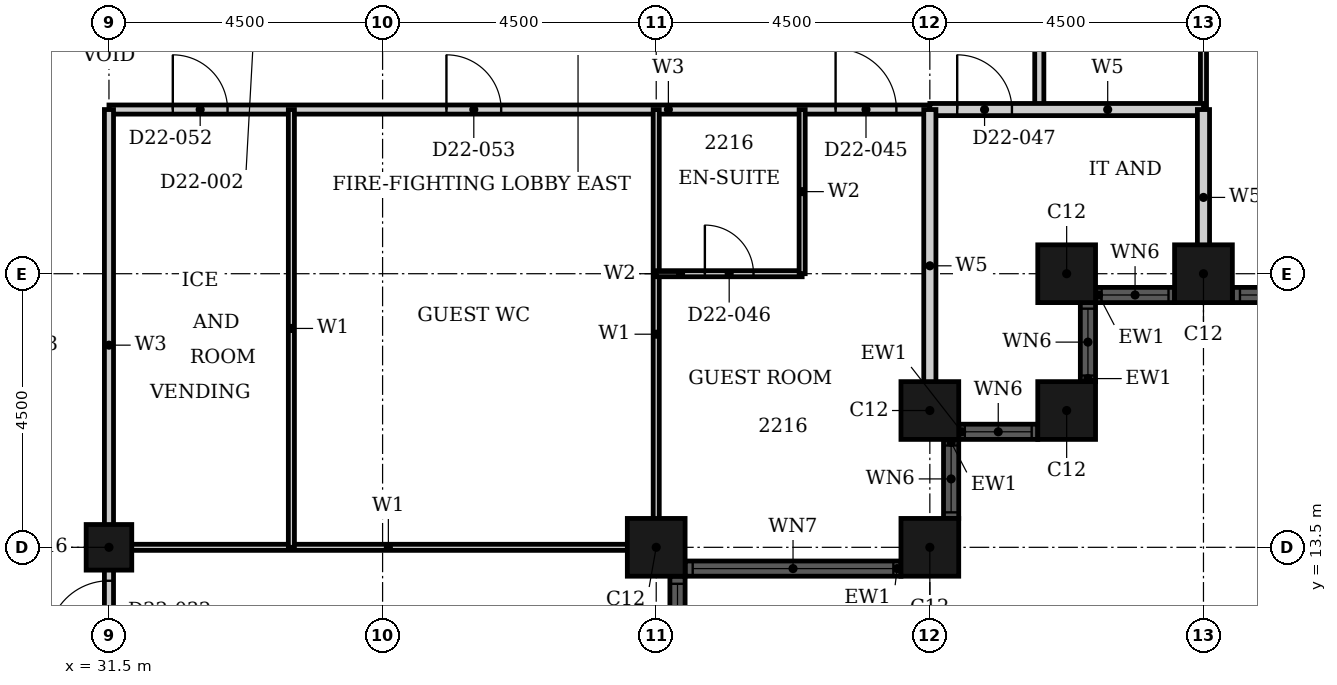
"""IFC4 building model, lengths in metres.
Left out: names, types, materials, properties, quantities, classifications, styles, units other than length and angle.
Written with IfcOpenShell. Run it as: python <this file> out.ifc"""

import sys

from ifc_helpers import new_model, si_unit, direction, frame, frame_2d, origin, origin_2d, place, context, subcontext, project, spatial, rectangle, hollow_rectangle, extrude, element, fill, save


model = new_model("IFC4")
c1 = context("Model", 3, precision=1e-05, world=origin(), true_north=direction((0.0, 1.0)))
c2 = subcontext(c1, "Body", "Model", "MODEL_VIEW")
j1 = project(units=[si_unit("LENGTHUNIT", "METRE"), si_unit("PLANEANGLEUNIT", "RADIAN")], contexts=[c1])
p1 = place(None, origin())
s1 = spatial("IfcSite", under=j1, at=p1, CompositionType="ELEMENT")
p2 = place(p1, origin())
s2 = spatial("IfcBuilding", under=s1, at=p2, CompositionType="ELEMENT")
p3 = place(p2, frame((0.0, 0.0, 92.4)))
s3 = spatial("IfcBuildingStorey", under=s2, at=p3, CompositionType="ELEMENT", Elevation=92.4)
for number, where, z_axis, x_axis in (
    (1, (40.5, 13.5, 0.0), (0.0, 0.0, 1.0), (1.0, 0.0, 0.0)),
    (2, (45.0, 13.5, 0.0), (0.0, 0.0, 1.0), (1.0, 0.0, 0.0)),
    (3, (45.0, 15.75, 0.0), (0.0, 0.0, 1.0), (1.0, 0.0, 0.0)),
    (4, (47.25, 15.75, 0.0), (0.0, 0.0, 1.0), (1.0, 0.0, 0.0)),
    (5, (47.25, 18.0, 0.0), (0.0, 0.0, 1.0), (1.0, 0.0, 0.0)),
    (6, (49.5, 18.0, 0.0), (0.0, 0.0, 1.0), (1.0, 0.0, 0.0)),
):
    element("IfcColumn", number, at=place(p3, frame(where, z_axis=z_axis, x_axis=x_axis)), inside=s3, PredefinedType="COLUMN", context=c2, shape_type="SweptSolid", body=[
        extrude(hollow_rectangle(XDim=0.95, YDim=0.95, WallThickness=0.03, at=origin_2d()), origin(), (0.0, 0.0, 1.0), 3.6),
    ])
p4 = place(p3, frame((31.5, 13.5, 0.0), z_axis=(0.0, 0.0, 1.0), x_axis=(1.0, 0.0, 0.0)))
e7 = element("IfcColumn", 7, at=p4, inside=s3, PredefinedType="COLUMN", context=c2, shape_type="SweptSolid", body=[
    extrude(hollow_rectangle(XDim=0.75, YDim=0.75, WallThickness=0.024, at=origin_2d()), origin(), (0.0, 0.0, 1.0), 3.6),
])
p5 = place(p3, frame((40.85, 4.975, 0.0), z_axis=(0.0, 0.0, 1.0), x_axis=(0.0, 1.0, 0.0)))
e8 = element("IfcWall", 8, at=p5, inside=s3, PredefinedType="SOLIDWALL", context=c2, shape_type="SweptSolid", body=[
    extrude(rectangle(XDim=8.05, YDim=0.25, at=frame_2d((4.025, 0.0))), origin(), (0.0, 0.0, 1.0), 3.6),
])
p6 = place(p5, frame((0.125, 0.0, 0.9)))
e9 = element("IfcOpeningElement", 9, at=p6, cuts=e8, PredefinedType="OPENING", context=c2, shape_type="SweptSolid", body=[
    extrude(rectangle(XDim=3.3, YDim=1.85, at=frame_2d((1.65, 0.925))), frame((0.0, 0.135, 0.0), z_axis=(0.0, -1.0, 0.0), x_axis=(1.0, 0.0, 0.0)), (0.0, 0.0, 1.0), 0.27),
])
p7 = place(p5, frame((4.625, 0.0, 0.9)))
e10 = element("IfcOpeningElement", 10, at=p7, cuts=e8, PredefinedType="OPENING", context=c2, shape_type="SweptSolid", body=[
    extrude(rectangle(XDim=3.3, YDim=1.85, at=frame_2d((1.65, 0.925))), frame((0.0, 0.135, 0.0), z_axis=(0.0, -1.0, 0.0), x_axis=(1.0, 0.0, 0.0)), (0.0, 0.0, 1.0), 0.27),
])
p8 = place(p3, frame((40.975, 13.15, 0.0), z_axis=(0.0, 0.0, 1.0), x_axis=(1.0, 0.0, 0.0)))
e11 = element("IfcWall", 11, at=p8, inside=s3, PredefinedType="SOLIDWALL", context=c2, shape_type="SweptSolid", body=[
    extrude(rectangle(XDim=3.55, YDim=0.25, at=frame_2d((1.775, 0.0))), origin(), (0.0, 0.0, 1.0), 3.6),
])
p9 = place(p8, frame((0.125, 0.0, 0.9)))
e12 = element("IfcOpeningElement", 12, at=p9, cuts=e11, PredefinedType="OPENING", context=c2, shape_type="SweptSolid", body=[
    extrude(rectangle(XDim=3.3, YDim=1.85, at=frame_2d((1.65, 0.925))), frame((0.0, 0.135, 0.0), z_axis=(0.0, -1.0, 0.0), x_axis=(1.0, 0.0, 0.0)), (0.0, 0.0, 1.0), 0.27),
])
p10 = place(p3, frame((45.35, 13.975, 0.0), z_axis=(0.0, 0.0, 1.0), x_axis=(0.0, 1.0, 0.0)))
e13 = element("IfcWall", 13, at=p10, inside=s3, PredefinedType="SOLIDWALL", context=c2, shape_type="SweptSolid", body=[
    extrude(rectangle(XDim=1.3, YDim=0.25, at=frame_2d((0.65, 0.0))), origin(), (0.0, 0.0, 1.0), 3.6),
])
p11 = place(p10, frame((0.1, 0.0, 0.9)))
e14 = element("IfcOpeningElement", 14, at=p11, cuts=e13, PredefinedType="OPENING", context=c2, shape_type="SweptSolid", body=[
    extrude(rectangle(XDim=1.1, YDim=1.85, at=frame_2d((0.55, 0.925))), frame((0.0, 0.135, 0.0), z_axis=(0.0, -1.0, 0.0), x_axis=(1.0, 0.0, 0.0)), (0.0, 0.0, 1.0), 0.27),
])
p12 = place(p3, frame((45.475, 15.4, 0.0), z_axis=(0.0, 0.0, 1.0), x_axis=(1.0, 0.0, 0.0)))
e15 = element("IfcWall", 15, at=p12, inside=s3, PredefinedType="SOLIDWALL", context=c2, shape_type="SweptSolid", body=[
    extrude(rectangle(XDim=1.3, YDim=0.25, at=frame_2d((0.65, 0.0))), origin(), (0.0, 0.0, 1.0), 3.6),
])
p13 = place(p12, frame((0.1, 0.0, 0.9)))
e16 = element("IfcOpeningElement", 16, at=p13, cuts=e15, PredefinedType="OPENING", context=c2, shape_type="SweptSolid", body=[
    extrude(rectangle(XDim=1.1, YDim=1.85, at=frame_2d((0.55, 0.925))), frame((0.0, 0.135, 0.0), z_axis=(0.0, -1.0, 0.0), x_axis=(1.0, 0.0, 0.0)), (0.0, 0.0, 1.0), 0.27),
])
p14 = place(p3, frame((47.6, 16.225, 0.0), z_axis=(0.0, 0.0, 1.0), x_axis=(0.0, 1.0, 0.0)))
e17 = element("IfcWall", 17, at=p14, inside=s3, PredefinedType="SOLIDWALL", context=c2, shape_type="SweptSolid", body=[
    extrude(rectangle(XDim=1.3, YDim=0.25, at=frame_2d((0.65, 0.0))), origin(), (0.0, 0.0, 1.0), 3.6),
])
p15 = place(p14, frame((0.1, 0.0, 0.9)))
e18 = element("IfcOpeningElement", 18, at=p15, cuts=e17, PredefinedType="OPENING", context=c2, shape_type="SweptSolid", body=[
    extrude(rectangle(XDim=1.1, YDim=1.85, at=frame_2d((0.55, 0.925))), frame((0.0, 0.135, 0.0), z_axis=(0.0, -1.0, 0.0), x_axis=(1.0, 0.0, 0.0)), (0.0, 0.0, 1.0), 0.27),
])
p16 = place(p3, frame((47.725, 17.65, 0.0), z_axis=(0.0, 0.0, 1.0), x_axis=(1.0, 0.0, 0.0)))
e19 = element("IfcWall", 19, at=p16, inside=s3, PredefinedType="SOLIDWALL", context=c2, shape_type="SweptSolid", body=[
    extrude(rectangle(XDim=1.3, YDim=0.25, at=frame_2d((0.65, 0.0))), origin(), (0.0, 0.0, 1.0), 3.6),
])
p17 = place(p16, frame((0.1, 0.0, 0.9)))
e20 = element("IfcOpeningElement", 20, at=p17, cuts=e19, PredefinedType="OPENING", context=c2, shape_type="SweptSolid", body=[
    extrude(rectangle(XDim=1.1, YDim=1.85, at=frame_2d((0.55, 0.925))), frame((0.0, 0.135, 0.0), z_axis=(0.0, -1.0, 0.0), x_axis=(1.0, 0.0, 0.0)), (0.0, 0.0, 1.0), 0.27),
])
p18 = place(p3, frame((49.975, 17.65, 0.0), z_axis=(0.0, 0.0, 1.0), x_axis=(1.0, 0.0, 0.0)))
e21 = element("IfcWall", 21, at=p18, inside=s3, PredefinedType="SOLIDWALL", context=c2, shape_type="SweptSolid", body=[
    extrude(rectangle(XDim=8.05, YDim=0.25, at=frame_2d((4.025, 0.0))), origin(), (0.0, 0.0, 1.0), 3.6),
])
p19 = place(p18, frame((0.125, 0.0, 0.9)))
e22 = element("IfcOpeningElement", 22, at=p19, cuts=e21, PredefinedType="OPENING", context=c2, shape_type="SweptSolid", body=[
    extrude(rectangle(XDim=3.3, YDim=1.85, at=frame_2d((1.65, 0.925))), frame((0.0, 0.135, 0.0), z_axis=(0.0, -1.0, 0.0), x_axis=(1.0, 0.0, 0.0)), (0.0, 0.0, 1.0), 0.27),
])
p20 = place(p18, frame((4.625, 0.0, 0.9)))
e23 = element("IfcOpeningElement", 23, at=p20, cuts=e21, PredefinedType="OPENING", context=c2, shape_type="SweptSolid", body=[
    extrude(rectangle(XDim=3.3, YDim=1.85, at=frame_2d((1.65, 0.925))), frame((0.0, 0.135, 0.0), z_axis=(0.0, -1.0, 0.0), x_axis=(1.0, 0.0, 0.0)), (0.0, 0.0, 1.0), 0.27),
])
p21 = place(p3, frame((31.5, 20.7, 0.0), z_axis=(0.0, 0.0, 1.0), x_axis=(1.0, 0.0, 0.0)))
e24 = element("IfcWall", 24, at=p21, inside=s3, PredefinedType="PARTITIONING", context=c2, shape_type="SweptSolid", body=[
    extrude(rectangle(XDim=13.5, YDim=0.15, at=frame_2d((6.75, 0.0))), origin(), (0.0, 0.0, 1.0), 3.2),
])
p22 = place(p21, frame((11.95, 0.0, 0.0)))
e25 = element("IfcOpeningElement", 25, at=p22, cuts=e24, PredefinedType="OPENING", context=c2, shape_type="SweptSolid", body=[
    extrude(rectangle(XDim=1.0, YDim=2.1, at=frame_2d((0.5, 1.05))), frame((0.0, 0.085, 0.0), z_axis=(0.0, -1.0, 0.0), x_axis=(1.0, 0.0, 0.0)), (0.0, 0.0, 1.0), 0.17),
])
p23 = place(p21, frame((1.05, 0.0, 0.0)))
e26 = element("IfcOpeningElement", 26, at=p23, cuts=e24, PredefinedType="OPENING", context=c2, shape_type="SweptSolid", body=[
    extrude(rectangle(XDim=0.9, YDim=2.1, at=frame_2d((0.45, 1.05))), frame((0.0, 0.085, 0.0), z_axis=(0.0, -1.0, 0.0), x_axis=(1.0, 0.0, 0.0)), (0.0, 0.0, 1.0), 0.17),
])
p24 = place(p21, frame((5.55, 0.0, 0.0)))
e27 = element("IfcOpeningElement", 27, at=p24, cuts=e24, PredefinedType="OPENING", context=c2, shape_type="SweptSolid", body=[
    extrude(rectangle(XDim=0.9, YDim=2.1, at=frame_2d((0.45, 1.05))), frame((0.0, 0.085, 0.0), z_axis=(0.0, -1.0, 0.0), x_axis=(1.0, 0.0, 0.0)), (0.0, 0.0, 1.0), 0.17),
])
p25 = place(p3, frame((31.5, 9.0, 0.0), z_axis=(0.0, 0.0, 1.0), x_axis=(0.0, 1.0, 0.0)))
e28 = element("IfcWall", 28, at=p25, inside=s3, PredefinedType="PARTITIONING", context=c2, shape_type="SweptSolid", body=[
    extrude(rectangle(XDim=11.7, YDim=0.15, at=frame_2d((5.85, 0.0))), origin(), (0.0, 0.0, 1.0), 2.48),
])
p26 = place(p25, frame((2.95, 0.0, 0.0)))
e29 = element("IfcOpeningElement", 29, at=p26, cuts=e28, PredefinedType="OPENING", context=c2, shape_type="SweptSolid", body=[
    extrude(rectangle(XDim=1.0, YDim=2.1, at=frame_2d((0.5, 1.05))), frame((0.0, 0.085, 0.0), z_axis=(0.0, -1.0, 0.0), x_axis=(1.0, 0.0, 0.0)), (0.0, 0.0, 1.0), 0.17),
])
p27 = place(p3, frame((46.8, 20.7, 0.0), z_axis=(0.0, 0.0, 1.0), x_axis=(0.0, 1.0, 0.0)))
e30 = element("IfcWall", 30, at=p27, inside=s3, PredefinedType="PARTITIONING", context=c2, shape_type="SweptSolid", body=[
    extrude(rectangle(XDim=6.3, YDim=0.15, at=frame_2d((3.15, 0.0))), origin(), (0.0, 0.0, 1.0), 3.2),
])
p28 = place(p27, frame((2.65, 0.0, 0.0)))
e31 = element("IfcOpeningElement", 31, at=p28, cuts=e30, PredefinedType="OPENING", context=c2, shape_type="SweptSolid", body=[
    extrude(rectangle(XDim=0.9, YDim=2.1, at=frame_2d((0.45, 1.05))), frame((0.0, 0.085, 0.0), z_axis=(0.0, -1.0, 0.0), x_axis=(1.0, 0.0, 0.0)), (0.0, 0.0, 1.0), 0.17),
])
p29 = place(p3, frame((31.5, 13.5, 0.0), z_axis=(0.0, 0.0, 1.0), x_axis=(1.0, 0.0, 0.0)))
e32 = element("IfcWall", 32, at=p29, inside=s3, PredefinedType="PARTITIONING", context=c2, shape_type="SweptSolid", body=[
    extrude(rectangle(XDim=9.19, YDim=0.1, at=frame_2d((4.595, 0.0))), origin(), (0.0, 0.0, 1.0), 2.28),
])
p30 = place(p3, frame((34.5, 13.5, 0.0), z_axis=(0.0, 0.0, 1.0), x_axis=(0.0, 1.0, 0.0)))
e33 = element("IfcWall", 33, at=p30, inside=s3, PredefinedType="PARTITIONING", context=c2, shape_type="SweptSolid", body=[
    extrude(rectangle(XDim=7.2, YDim=0.1, at=frame_2d((3.6, 0.0))), origin(), (0.0, 0.0, 1.0), 3.2),
])
p31 = place(p3, frame((40.5, 13.31, 0.0), z_axis=(0.0, 0.0, 1.0), x_axis=(0.0, 1.0, 0.0)))
e34 = element("IfcWall", 34, at=p31, inside=s3, PredefinedType="PARTITIONING", context=c2, shape_type="SweptSolid", body=[
    extrude(rectangle(XDim=7.39, YDim=0.1, at=frame_2d((3.695, 0.0))), origin(), (0.0, 0.0, 1.0), 3.2),
])
p32 = place(p3, frame((49.5, 20.7, 0.0), z_axis=(0.0, 0.0, 1.0), x_axis=(0.0, 1.0, 0.0)))
e35 = element("IfcWall", 35, at=p32, inside=s3, PredefinedType="PARTITIONING", context=c2, shape_type="SweptSolid", body=[
    extrude(rectangle(XDim=6.3, YDim=0.1, at=frame_2d((3.15, 0.0))), origin(), (0.0, 0.0, 1.0), 2.28),
])
p33 = place(p3, frame((40.5, 18.0, 0.0), z_axis=(0.0, 0.0, 1.0), x_axis=(1.0, 0.0, 0.0)))
e36 = element("IfcWall", 36, at=p33, inside=s3, PredefinedType="PARTITIONING", context=c2, shape_type="SweptSolid", body=[
    extrude(rectangle(XDim=2.4, YDim=0.1, at=frame_2d((1.2, 0.0))), origin(), (0.0, 0.0, 1.0), 3.2),
])
p34 = place(p33, frame((0.8, 0.0, 0.0)))
e37 = element("IfcOpeningElement", 37, at=p34, cuts=e36, PredefinedType="OPENING", context=c2, shape_type="SweptSolid", body=[
    extrude(rectangle(XDim=0.8, YDim=2.1, at=frame_2d((0.4, 1.05))), frame((0.0, 0.06, 0.0), z_axis=(0.0, -1.0, 0.0), x_axis=(1.0, 0.0, 0.0)), (0.0, 0.0, 1.0), 0.12),
])
p35 = place(p3, frame((42.9, 18.0, 0.0), z_axis=(0.0, 0.0, 1.0), x_axis=(0.0, 1.0, 0.0)))
e38 = element("IfcWall", 38, at=p35, inside=s3, PredefinedType="PARTITIONING", context=c2, shape_type="SweptSolid", body=[
    extrude(rectangle(XDim=2.7, YDim=0.1, at=frame_2d((1.35, 0.0))), origin(), (0.0, 0.0, 1.0), 3.2),
])
p36 = place(p3, frame((45.0, 20.7, 0.0), z_axis=(0.0, 0.0, 1.0), x_axis=(1.0, 0.0, 0.0)))
e39 = element("IfcWall", 39, at=p36, inside=s3, PredefinedType="PARTITIONING", context=c2, shape_type="SweptSolid", body=[
    extrude(rectangle(XDim=4.5, YDim=0.2, at=frame_2d((2.25, 0.0))), origin(), (0.0, 0.0, 1.0), 3.2),
])
p37 = place(p36, frame((0.45, 0.0, 0.0)))
e40 = element("IfcOpeningElement", 40, at=p37, cuts=e39, PredefinedType="OPENING", context=c2, shape_type="SweptSolid", body=[
    extrude(rectangle(XDim=0.9, YDim=2.1, at=frame_2d((0.45, 1.05))), frame((0.0, 0.11, 0.0), z_axis=(0.0, -1.0, 0.0), x_axis=(1.0, 0.0, 0.0)), (0.0, 0.0, 1.0), 0.22),
])
p38 = place(p3, frame((45.0, 15.56, 0.0), z_axis=(0.0, 0.0, 1.0), x_axis=(0.0, 1.0, 0.0)))
e41 = element("IfcWall", 41, at=p38, inside=s3, PredefinedType="PARTITIONING", context=c2, shape_type="SweptSolid", body=[
    extrude(rectangle(XDim=5.14, YDim=0.2, at=frame_2d((2.57, 0.0))), origin(), (0.0, 0.0, 1.0), 3.2),
])
p39 = place(p3, frame((49.5, 17.81, 0.0), z_axis=(0.0, 0.0, 1.0), x_axis=(0.0, 1.0, 0.0)))
e42 = element("IfcWall", 42, at=p39, inside=s3, PredefinedType="PARTITIONING", context=c2, shape_type="SweptSolid", body=[
    extrude(rectangle(XDim=2.89, YDim=0.2, at=frame_2d((1.445, 0.0))), origin(), (0.0, 0.0, 1.0), 2.28),
])
p40 = place(p7, origin())
e43 = element("IfcWindow", 43, at=p40, inside=s3, PartitioningType="SINGLE_PANEL", PredefinedType="WINDOW", context=c2, shape_type="SweptSolid", body=[
    extrude(rectangle(XDim=3.3, YDim=1.85, at=frame_2d((1.65, 0.925))), frame((0.0, 0.03, 0.0), z_axis=(0.0, -1.0, 0.0), x_axis=(1.0, 0.0, 0.0)), (0.0, 0.0, 1.0), 0.06),
])
fill(e10, e43)
p41 = place(p9, origin())
e44 = element("IfcWindow", 44, at=p41, inside=s3, PartitioningType="SINGLE_PANEL", PredefinedType="WINDOW", context=c2, shape_type="SweptSolid", body=[
    extrude(rectangle(XDim=3.3, YDim=1.85, at=frame_2d((1.65, 0.925))), frame((0.0, 0.03, 0.0), z_axis=(0.0, -1.0, 0.0), x_axis=(1.0, 0.0, 0.0)), (0.0, 0.0, 1.0), 0.06),
])
fill(e12, e44)
p42 = place(p11, origin())
e45 = element("IfcWindow", 45, at=p42, inside=s3, PartitioningType="SINGLE_PANEL", PredefinedType="WINDOW", context=c2, shape_type="SweptSolid", body=[
    extrude(rectangle(XDim=1.1, YDim=1.85, at=frame_2d((0.55, 0.925))), frame((0.0, 0.03, 0.0), z_axis=(0.0, -1.0, 0.0), x_axis=(1.0, 0.0, 0.0)), (0.0, 0.0, 1.0), 0.06),
])
fill(e14, e45)
p43 = place(p13, origin())
e46 = element("IfcWindow", 46, at=p43, inside=s3, PartitioningType="SINGLE_PANEL", PredefinedType="WINDOW", context=c2, shape_type="SweptSolid", body=[
    extrude(rectangle(XDim=1.1, YDim=1.85, at=frame_2d((0.55, 0.925))), frame((0.0, 0.03, 0.0), z_axis=(0.0, -1.0, 0.0), x_axis=(1.0, 0.0, 0.0)), (0.0, 0.0, 1.0), 0.06),
])
fill(e16, e46)
p44 = place(p15, origin())
e47 = element("IfcWindow", 47, at=p44, inside=s3, PartitioningType="SINGLE_PANEL", PredefinedType="WINDOW", context=c2, shape_type="SweptSolid", body=[
    extrude(rectangle(XDim=1.1, YDim=1.85, at=frame_2d((0.55, 0.925))), frame((0.0, 0.03, 0.0), z_axis=(0.0, -1.0, 0.0), x_axis=(1.0, 0.0, 0.0)), (0.0, 0.0, 1.0), 0.06),
])
fill(e18, e47)
p45 = place(p17, origin())
e48 = element("IfcWindow", 48, at=p45, inside=s3, PartitioningType="SINGLE_PANEL", PredefinedType="WINDOW", context=c2, shape_type="SweptSolid", body=[
    extrude(rectangle(XDim=1.1, YDim=1.85, at=frame_2d((0.55, 0.925))), frame((0.0, 0.03, 0.0), z_axis=(0.0, -1.0, 0.0), x_axis=(1.0, 0.0, 0.0)), (0.0, 0.0, 1.0), 0.06),
])
fill(e20, e48)
p46 = place(p19, origin())
e49 = element("IfcWindow", 49, at=p46, inside=s3, PartitioningType="SINGLE_PANEL", PredefinedType="WINDOW", context=c2, shape_type="SweptSolid", body=[
    extrude(rectangle(XDim=3.3, YDim=1.85, at=frame_2d((1.65, 0.925))), frame((0.0, 0.03, 0.0), z_axis=(0.0, -1.0, 0.0), x_axis=(1.0, 0.0, 0.0)), (0.0, 0.0, 1.0), 0.06),
])
fill(e22, e49)
p47 = place(p26, origin())
e50 = element("IfcDoor", 50, at=p47, inside=s3, OperationType="SINGLE_SWING_RIGHT", PredefinedType="DOOR", context=c2, shape_type="SweptSolid", body=[
    extrude(rectangle(XDim=1.0, YDim=2.1, at=frame_2d((0.5, 1.05))), frame((0.0, 0.025, 0.0), z_axis=(0.0, -1.0, 0.0), x_axis=(1.0, 0.0, 0.0)), (0.0, 0.0, 1.0), 0.05),
])
fill(e29, e50)
p48 = place(p22, origin())
e51 = element("IfcDoor", 51, at=p48, inside=s3, OperationType="SINGLE_SWING_RIGHT", PredefinedType="DOOR", context=c2, shape_type="SweptSolid", body=[
    extrude(rectangle(XDim=1.0, YDim=2.1, at=frame_2d((0.5, 1.05))), frame((0.0, 0.025, 0.0), z_axis=(0.0, -1.0, 0.0), x_axis=(1.0, 0.0, 0.0)), (0.0, 0.0, 1.0), 0.05),
])
fill(e25, e51)
p49 = place(p34, origin())
e52 = element("IfcDoor", 52, at=p49, inside=s3, OperationType="SINGLE_SWING_RIGHT", PredefinedType="DOOR", context=c2, shape_type="SweptSolid", body=[
    extrude(rectangle(XDim=0.8, YDim=2.1, at=frame_2d((0.4, 1.05))), frame((0.0, 0.025, 0.0), z_axis=(0.0, -1.0, 0.0), x_axis=(1.0, 0.0, 0.0)), (0.0, 0.0, 1.0), 0.05),
])
fill(e37, e52)
p50 = place(p37, origin())
e53 = element("IfcDoor", 53, at=p50, inside=s3, OperationType="SINGLE_SWING_LEFT", PredefinedType="DOOR", context=c2, shape_type="SweptSolid", body=[
    extrude(rectangle(XDim=0.9, YDim=2.1, at=frame_2d((0.45, 1.05))), frame((0.0, 0.025, 0.0), z_axis=(0.0, -1.0, 0.0), x_axis=(1.0, 0.0, 0.0)), (0.0, 0.0, 1.0), 0.05),
])
fill(e40, e53)
p51 = place(p23, origin())
e54 = element("IfcDoor", 54, at=p51, inside=s3, OperationType="SINGLE_SWING_RIGHT", PredefinedType="DOOR", context=c2, shape_type="SweptSolid", body=[
    extrude(rectangle(XDim=0.9, YDim=2.1, at=frame_2d((0.45, 1.05))), frame((0.0, 0.025, 0.0), z_axis=(0.0, -1.0, 0.0), x_axis=(1.0, 0.0, 0.0)), (0.0, 0.0, 1.0), 0.05),
])
fill(e26, e54)
p52 = place(p24, origin())
e55 = element("IfcDoor", 55, at=p52, inside=s3, OperationType="SINGLE_SWING_LEFT", PredefinedType="DOOR", context=c2, shape_type="SweptSolid", body=[
    extrude(rectangle(XDim=0.9, YDim=2.1, at=frame_2d((0.45, 1.05))), frame((0.0, 0.025, 0.0), z_axis=(0.0, -1.0, 0.0), x_axis=(1.0, 0.0, 0.0)), (0.0, 0.0, 1.0), 0.05),
])
fill(e27, e55)
save(model, sys.argv[1])
